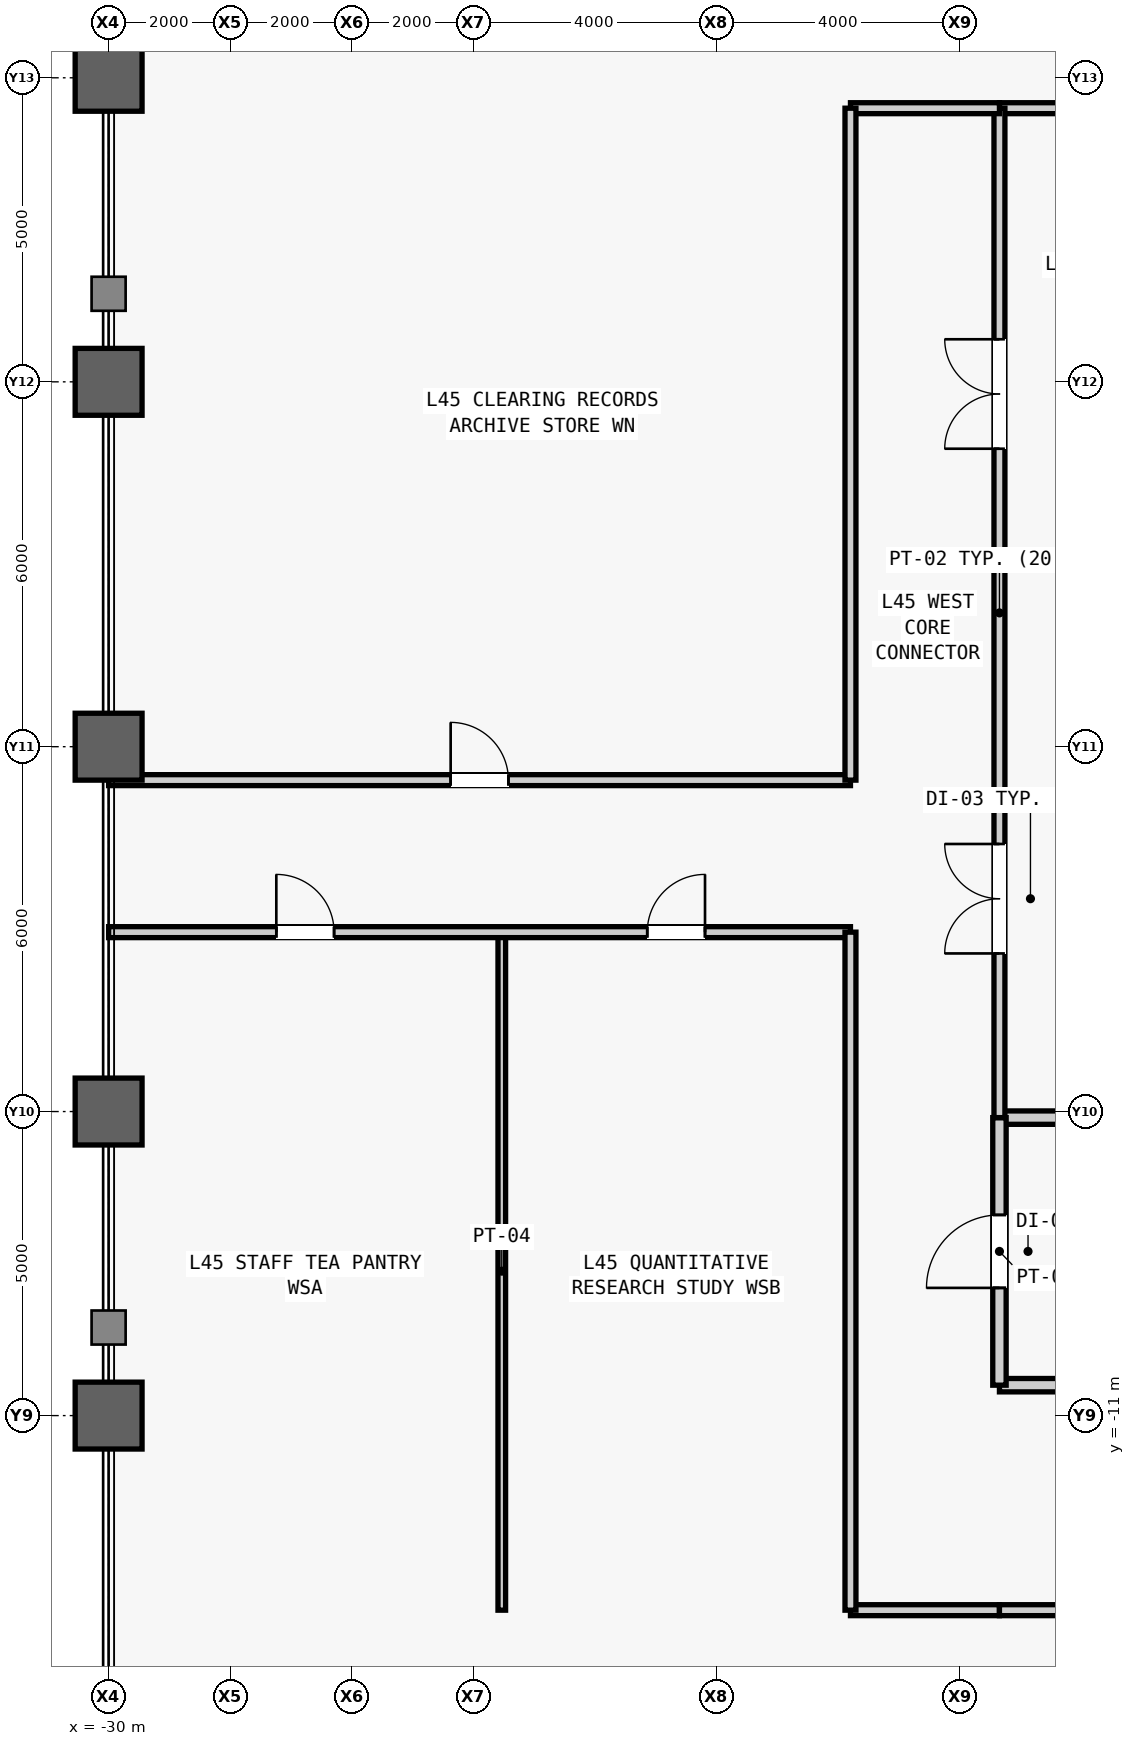
"""IFC4 building model, lengths in metres.
Left out: names, types, materials, properties, quantities, classifications, styles, units other than length and angle.
Written with IfcOpenShell. Run it as: python <this file> out.ifc"""

import sys

from ifc_helpers import new_model, si_unit, direction, frame, frame_2d, origin, origin_2d, place, context, subcontext, project, spatial, rectangle, hollow_rectangle, extrude, source, transform, mapped, element, fill, save


model = new_model("IFC4")
c1 = context("Model", 3, precision=1e-05, world=origin(), true_north=direction((0.0, 1.0)))
c2 = subcontext(c1, "Body", "Model", "MODEL_VIEW")
j1 = project(units=[si_unit("LENGTHUNIT", "METRE"), si_unit("PLANEANGLEUNIT", "RADIAN")], contexts=[c1])
p1 = place(None, origin())
s1 = spatial("IfcSite", under=j1, at=p1, CompositionType="ELEMENT")
p2 = place(p1, origin())
s2 = spatial("IfcBuilding", under=s1, at=p2, CompositionType="ELEMENT")
p3 = place(p2, frame((0.0, 0.0, 195.1)))
s3 = spatial("IfcBuildingStorey", under=s2, at=p3, CompositionType="ELEMENT", Elevation=195.1)
m1 = source(origin(), c2, "Body", "SweptSolid", [
    extrude(hollow_rectangle(XDim=1.1, YDim=1.1, WallThickness=0.06, at=origin_2d()), origin(), (0.0, 0.0, 1.0), 4.0),
])
for number, where, z_axis, x_axis in (
    (1, (-30.0, -11.0, 0.0), (0.0, 0.0, 1.0), (1.0, 0.0, 0.0)),
    (2, (-30.0, -6.0, 0.0), (0.0, 0.0, 1.0), (1.0, 0.0, 0.0)),
    (3, (-30.0, 0.0, 0.0), (0.0, 0.0, 1.0), (1.0, 0.0, 0.0)),
    (4, (-30.0, 6.0, 0.0), (0.0, 0.0, 1.0), (1.0, 0.0, 0.0)),
    (5, (-30.0, 11.0, 0.0), (0.0, 0.0, 1.0), (1.0, 0.0, 0.0)),
):
    element("IfcColumn", number, at=place(p3, frame(where, z_axis=z_axis, x_axis=x_axis)), inside=s3, PredefinedType="COLUMN", context=c2, shape_type="MappedRepresentation", body=[
        mapped(m1, transform((0.0, 0.0, 0.0), scale=1.0)),
    ])
m2 = source(origin(), c2, "Body", "SweptSolid", [
    extrude(rectangle(XDim=4.05, YDim=0.22, at=frame_2d((2.025, 0.0))), origin(), (0.0, 0.0, 1.0), 3.78),
])
p4 = place(p3, frame((-15.35, -10.5, 0.0), z_axis=(0.0, 0.0, 1.0), x_axis=(1.0, 0.0, 0.0)))
e6 = element("IfcWall", 6, at=p4, inside=s3, PredefinedType="PARTITIONING", context=c2, shape_type="MappedRepresentation", body=[
    mapped(m2, transform((0.0, 0.0, 0.0), scale=1.0)),
])
m3 = source(origin(), c2, "Body", "SweptSolid", [
    extrude(rectangle(XDim=4.05, YDim=0.22, at=frame_2d((2.025, 0.0))), origin(), (0.0, 0.0, 1.0), 3.007),
])
p5 = place(p3, frame((-15.35, -6.1, 0.0), z_axis=(0.0, 0.0, 1.0), x_axis=(1.0, 0.0, 0.0)))
e7 = element("IfcWall", 7, at=p5, inside=s3, PredefinedType="PARTITIONING", context=c2, shape_type="MappedRepresentation", body=[
    mapped(m3, transform((0.0, 0.0, 0.0), scale=1.0)),
])
m4 = source(origin(), c2, "Body", "SweptSolid", [
    extrude(rectangle(XDim=4.4, YDim=0.22, at=frame_2d((2.2, 0.0))), origin(), (0.0, 0.0, 1.0), 3.78),
])
p6 = place(p3, frame((-15.35, -10.5, 0.0), z_axis=(0.0, 0.0, 1.0), x_axis=(0.0, 1.0, 0.0)))
e8 = element("IfcWall", 8, at=p6, inside=s3, PredefinedType="PARTITIONING", context=c2, shape_type="MappedRepresentation", body=[
    mapped(m4, transform((0.0, 0.0, 0.0), scale=1.0)),
])
m5 = source(origin(), c2, "Body", "SweptSolid", [
    extrude(rectangle(XDim=1.2, YDim=2.2, at=frame_2d((0.6, 1.1))), frame((0.0, 0.12, 0.0), z_axis=(0.0, -1.0, 0.0), x_axis=(1.0, 0.0, 0.0)), (0.0, 0.0, 1.0), 0.24),
])
p7 = place(p6, frame((1.6, 0.0, 0.0)))
e9 = element("IfcOpeningElement", 9, at=p7, cuts=e8, PredefinedType="OPENING", context=c2, shape_type="MappedRepresentation", body=[
    mapped(m5, transform((0.0, 0.0, 0.0), scale=1.0)),
])
m6 = source(origin(), c2, "Body", "SweptSolid", [
    extrude(rectangle(XDim=4.05, YDim=0.18, at=frame_2d((2.025, 0.0))), origin(), (0.0, 0.0, 1.0), 3.78),
])
p8 = place(p3, frame((-15.35, 10.5, 0.0), z_axis=(0.0, 0.0, 1.0), x_axis=(1.0, 0.0, 0.0)))
e10 = element("IfcWall", 10, at=p8, inside=s3, PredefinedType="PARTITIONING", context=c2, shape_type="MappedRepresentation", body=[
    mapped(m6, transform((0.0, 0.0, 0.0), scale=1.0)),
])
m7 = source(origin(), c2, "Body", "SweptSolid", [
    extrude(rectangle(XDim=16.6, YDim=0.18, at=frame_2d((8.3, 0.0))), origin(), (0.0, 0.0, 1.0), 3.78),
])
p9 = place(p3, frame((-15.35, -6.1, 0.0), z_axis=(0.0, 0.0, 1.0), x_axis=(0.0, 1.0, 0.0)))
e11 = element("IfcWall", 11, at=p9, inside=s3, PredefinedType="PARTITIONING", context=c2, shape_type="MappedRepresentation", body=[
    mapped(m7, transform((0.0, 0.0, 0.0), scale=1.0)),
])
m8 = source(origin(), c2, "Body", "SweptSolid", [
    extrude(rectangle(XDim=1.8, YDim=2.25, at=frame_2d((0.9, 1.125))), frame((0.0, 0.1, 0.0), z_axis=(0.0, -1.0, 0.0), x_axis=(1.0, 0.0, 0.0)), (0.0, 0.0, 1.0), 0.2),
])
p10 = place(p9, frame((2.7, 0.0, 0.0)))
e12 = element("IfcOpeningElement", 12, at=p10, cuts=e11, PredefinedType="OPENING", context=c2, shape_type="MappedRepresentation", body=[
    mapped(m8, transform((0.0, 0.0, 0.0), scale=1.0)),
])
p11 = place(p9, frame((11.0, 0.0, 0.0)))
e13 = element("IfcOpeningElement", 13, at=p11, cuts=e11, PredefinedType="OPENING", context=c2, shape_type="MappedRepresentation", body=[
    mapped(m8, transform((0.0, 0.0, 0.0), scale=1.0)),
])
m9 = source(origin(), c2, "Body", "SweptSolid", [
    extrude(rectangle(XDim=2.45, YDim=0.18, at=frame_2d((1.225, 0.0))), origin(), (0.0, 0.0, 1.0), 3.78),
])
for number, where, z_axis, x_axis in (
    (14, (-17.8, 10.5, 0.0), (0.0, 0.0, 1.0), (1.0, 0.0, 0.0)),
    (15, (-17.8, -14.2, 0.0), (0.0, 0.0, 1.0), (1.0, 0.0, 0.0)),
):
    element("IfcWall", number, at=place(p3, frame(where, z_axis=z_axis, x_axis=x_axis)), inside=s3, PredefinedType="PARTITIONING", context=c2, shape_type="MappedRepresentation", body=[
        mapped(m9, transform((0.0, 0.0, 0.0), scale=1.0)),
    ])
m10 = source(origin(), c2, "Body", "SweptSolid", [
    extrude(rectangle(XDim=14.95, YDim=0.18, at=frame_2d((7.475, 0.0))), origin(), (0.0, 0.0, 1.0), 3.78),
])
p12 = place(p3, frame((-15.35, -14.2, 0.0), z_axis=(0.0, 0.0, 1.0), x_axis=(1.0, 0.0, 0.0)))
e16 = element("IfcWall", 16, at=p12, inside=s3, PredefinedType="PARTITIONING", context=c2, shape_type="MappedRepresentation", body=[
    mapped(m10, transform((0.0, 0.0, 0.0), scale=1.0)),
])
m11 = source(origin(), c2, "Body", "SweptSolid", [
    extrude(rectangle(XDim=11.15, YDim=0.125, at=frame_2d((5.575, 0.0))), origin(), (0.0, 0.0, 1.0), 3.78),
])
p13 = place(p3, frame((-23.534, -14.2, 0.0), z_axis=(0.0, 0.0, 1.0), x_axis=(0.0, 1.0, 0.0)))
e17 = element("IfcWall", 17, at=p13, inside=s3, PredefinedType="PARTITIONING", context=c2, shape_type="MappedRepresentation", body=[
    mapped(m11, transform((0.0, 0.0, 0.0), scale=1.0)),
])
m12 = source(origin(), c2, "Body", "SweptSolid", [
    extrude(rectangle(XDim=12.2, YDim=0.18, at=frame_2d((6.1, 0.0))), origin(), (0.0, 0.0, 1.0), 3.78),
])
p14 = place(p3, frame((-30.0, -3.05, 0.0), z_axis=(0.0, 0.0, 1.0), x_axis=(1.0, 0.0, 0.0)))
e18 = element("IfcWall", 18, at=p14, inside=s3, PredefinedType="PARTITIONING", context=c2, shape_type="MappedRepresentation", body=[
    mapped(m12, transform((0.0, 0.0, 0.0), scale=1.0)),
])
m13 = source(origin(), c2, "Body", "SweptSolid", [
    extrude(rectangle(XDim=0.95, YDim=2.15, at=frame_2d((0.475, 1.075))), frame((0.0, 0.1, 0.0), z_axis=(0.0, -1.0, 0.0), x_axis=(1.0, 0.0, 0.0)), (0.0, 0.0, 1.0), 0.2),
])
p15 = place(p14, frame((2.758, 0.0, 0.0)))
e19 = element("IfcOpeningElement", 19, at=p15, cuts=e18, PredefinedType="OPENING", context=c2, shape_type="MappedRepresentation", body=[
    mapped(m13, transform((0.0, 0.0, 0.0), scale=1.0)),
])
p16 = place(p14, frame((8.858, 0.0, 0.0)))
e20 = element("IfcOpeningElement", 20, at=p16, cuts=e18, PredefinedType="OPENING", context=c2, shape_type="MappedRepresentation", body=[
    mapped(m13, transform((0.0, 0.0, 0.0), scale=1.0)),
])
m14 = source(origin(), c2, "Body", "SweptSolid", [
    extrude(rectangle(XDim=11.15, YDim=0.18, at=frame_2d((5.575, 0.0))), origin(), (0.0, 0.0, 1.0), 3.78),
])
p17 = place(p3, frame((-17.8, -14.2, 0.0), z_axis=(0.0, 0.0, 1.0), x_axis=(0.0, 1.0, 0.0)))
e21 = element("IfcWall", 21, at=p17, inside=s3, PredefinedType="PARTITIONING", context=c2, shape_type="MappedRepresentation", body=[
    mapped(m14, transform((0.0, 0.0, 0.0), scale=1.0)),
])
p18 = place(p3, frame((-30.0, -0.55, 0.0), z_axis=(0.0, 0.0, 1.0), x_axis=(1.0, 0.0, 0.0)))
e22 = element("IfcWall", 22, at=p18, inside=s3, PredefinedType="PARTITIONING", context=c2, shape_type="MappedRepresentation", body=[
    mapped(m12, transform((0.0, 0.0, 0.0), scale=1.0)),
])
p19 = place(p18, frame((5.625, 0.0, 0.0)))
e23 = element("IfcOpeningElement", 23, at=p19, cuts=e22, PredefinedType="OPENING", context=c2, shape_type="MappedRepresentation", body=[
    mapped(m13, transform((0.0, 0.0, 0.0), scale=1.0)),
])
m15 = source(origin(), c2, "Body", "SweptSolid", [
    extrude(rectangle(XDim=11.05, YDim=0.18, at=frame_2d((5.525, 0.0))), origin(), (0.0, 0.0, 1.0), 3.78),
])
p20 = place(p3, frame((-17.8, -0.55, 0.0), z_axis=(0.0, 0.0, 1.0), x_axis=(0.0, 1.0, 0.0)))
e24 = element("IfcWall", 24, at=p20, inside=s3, PredefinedType="PARTITIONING", context=c2, shape_type="MappedRepresentation", body=[
    mapped(m15, transform((0.0, 0.0, 0.0), scale=1.0)),
])
m16 = source(origin(), c2, "Body", "SweptSolid", [
    extrude(rectangle(XDim=1.2, YDim=2.2, at=frame_2d((0.6, 1.1))), frame((0.0, 0.025, 0.0), z_axis=(0.0, -1.0, 0.0), x_axis=(1.0, 0.0, 0.0)), (0.0, 0.0, 1.0), 0.05),
])
p21 = place(p7, origin())
e25 = element("IfcDoor", 25, at=p21, inside=s3, OperationType="SINGLE_SWING_LEFT", PredefinedType="DOOR", context=c2, shape_type="MappedRepresentation", body=[
    mapped(m16, transform((0.0, 0.0, 0.0), scale=1.0)),
])
fill(e9, e25)
m17 = source(origin(), c2, "Body", "SweptSolid", [
    extrude(rectangle(XDim=1.8, YDim=2.25, at=frame_2d((0.9, 1.125))), frame((0.0, 0.025, 0.0), z_axis=(0.0, -1.0, 0.0), x_axis=(1.0, 0.0, 0.0)), (0.0, 0.0, 1.0), 0.05),
])
p22 = place(p10, origin())
e26 = element("IfcDoor", 26, at=p22, inside=s3, OperationType="SINGLE_SWING_LEFT", PredefinedType="DOOR", context=c2, shape_type="MappedRepresentation", body=[
    mapped(m17, transform((0.0, 0.0, 0.0), scale=1.0)),
])
fill(e12, e26)
p23 = place(p11, origin())
e27 = element("IfcDoor", 27, at=p23, inside=s3, OperationType="SINGLE_SWING_RIGHT", PredefinedType="DOOR", context=c2, shape_type="MappedRepresentation", body=[
    mapped(m17, transform((0.0, 0.0, 0.0), scale=1.0)),
])
fill(e13, e27)
m18 = source(origin(), c2, "Body", "SweptSolid", [
    extrude(rectangle(XDim=0.95, YDim=2.15, at=frame_2d((0.475, 1.075))), frame((0.0, 0.025, 0.0), z_axis=(0.0, -1.0, 0.0), x_axis=(1.0, 0.0, 0.0)), (0.0, 0.0, 1.0), 0.05),
])
p24 = place(p15, origin())
e28 = element("IfcDoor", 28, at=p24, inside=s3, OperationType="SINGLE_SWING_LEFT", PredefinedType="DOOR", context=c2, shape_type="MappedRepresentation", body=[
    mapped(m18, transform((0.0, 0.0, 0.0), scale=1.0)),
])
fill(e19, e28)
p25 = place(p16, origin())
e29 = element("IfcDoor", 29, at=p25, inside=s3, OperationType="SINGLE_SWING_RIGHT", PredefinedType="DOOR", context=c2, shape_type="MappedRepresentation", body=[
    mapped(m18, transform((0.0, 0.0, 0.0), scale=1.0)),
])
fill(e20, e29)
p26 = place(p19, origin())
e30 = element("IfcDoor", 30, at=p26, inside=s3, OperationType="SINGLE_SWING_LEFT", PredefinedType="DOOR", context=c2, shape_type="MappedRepresentation", body=[
    mapped(m18, transform((0.0, 0.0, 0.0), scale=1.0)),
])
fill(e23, e30)
save(model, sys.argv[1])
